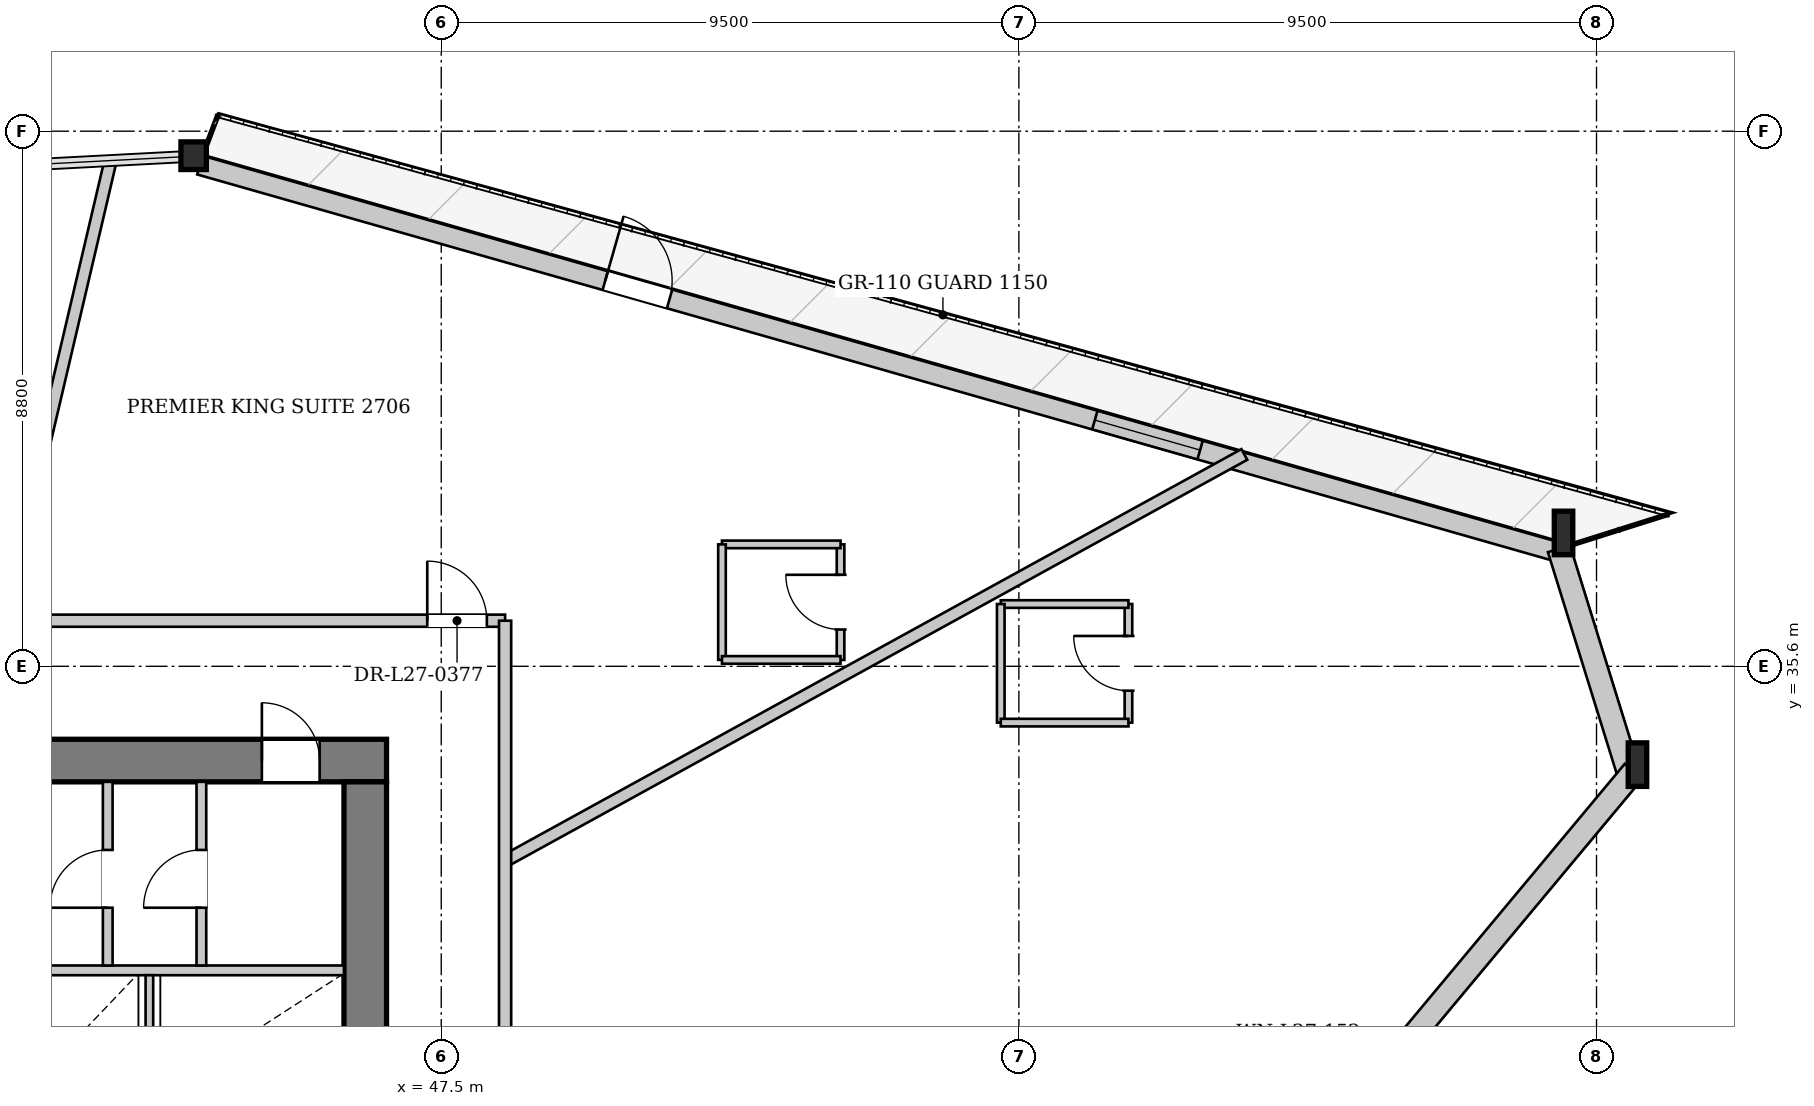
"""IFC4 building model, lengths in metres.
Left out: names, types, materials, properties, quantities, classifications, styles, units other than length and angle.
Written with IfcOpenShell. Run it as: python <this file> out.ifc"""

import sys

from ifc_helpers import new_model, si_unit, direction, frame, frame_2d, origin, origin_2d, place, context, subcontext, project, spatial, rectangle, i_section, extrude, source, transform, mapped, element, fill, save


model = new_model("IFC4")
c1 = context("Model", 3, precision=1e-05, world=origin(), true_north=direction((0.0, 1.0)))
c2 = subcontext(c1, "Body", "Model", "MODEL_VIEW")
j1 = project(units=[si_unit("LENGTHUNIT", "METRE"), si_unit("PLANEANGLEUNIT", "RADIAN")], contexts=[c1])
p1 = place(None, origin())
s1 = spatial("IfcSite", under=j1, at=p1, CompositionType="ELEMENT")
p2 = place(p1, origin())
s2 = spatial("IfcBuilding", under=s1, at=p2, CompositionType="ELEMENT")
p3 = place(p2, frame((0.0, 0.0, 105.7)))
s3 = spatial("IfcBuildingStorey", under=s2, at=p3, CompositionType="ELEMENT", Elevation=105.7)
m1 = source(origin(), c2, "Body", "SweptSolid", [
    extrude(i_section(OverallWidth=0.304, OverallDepth=0.716, WebThickness=0.021, FlangeThickness=0.04, at=origin_2d()), origin(), (0.0, 0.0, 1.0), 3.42),
])
p4 = place(p3, frame((67.255, 33.752, 0.0), z_axis=(-0.047894435472, 0.135260738032, 0.989651785123), x_axis=(-0.942650051896, -0.333782683284, 0.0)))
e1 = element("IfcColumn", 1, at=p4, inside=s3, PredefinedType="COLUMN", context=c2, shape_type="MappedRepresentation", body=[
    mapped(m1, transform((0.0, 0.0, 0.0), x_axis=(1.0, 0.0, 0.0), y_axis=(0.0, 1.0, 0.0), z_axis=(0.0, 0.0, 1.0), scale=1.0)),
])
m2 = source(origin(), c2, "Body", "SweptSolid", [
    extrude(i_section(OverallWidth=0.304, OverallDepth=0.716, WebThickness=0.021, FlangeThickness=0.04, at=origin_2d()), origin(), (0.0, 0.0, 1.0), 3.416),
])
p5 = place(p3, frame((66.063, 37.59, 0.0), z_axis=(-0.062036324357, 0.119141189749, 0.990937370052), x_axis=(-0.886964034529, -0.461838501483, 0.0)))
e2 = element("IfcColumn", 2, at=p5, inside=s3, PredefinedType="COLUMN", context=c2, shape_type="MappedRepresentation", body=[
    mapped(m2, transform((0.0, 0.0, 0.0), x_axis=(1.0, 0.0, 0.0), y_axis=(0.0, 1.0, 0.0), z_axis=(0.0, 0.0, 1.0), scale=1.0)),
])
m3 = source(origin(), c2, "Body", "SweptSolid", [
    extrude(i_section(OverallWidth=0.418, OverallDepth=0.455, WebThickness=0.038, FlangeThickness=0.059, at=origin_2d()), origin(), (0.0, 0.0, 1.0), 3.397),
])
p6 = place(p3, frame((43.573, 43.997, 0.0), z_axis=(-0.085727236226, 0.000143717077, 0.996318633929), x_axis=(-0.001676443579, -0.999998594767, 0.0)))
e3 = element("IfcColumn", 3, at=p6, inside=s3, PredefinedType="COLUMN", context=c2, shape_type="MappedRepresentation", body=[
    mapped(m3, transform((0.0, 0.0, 0.0), x_axis=(1.0, 0.0, 0.0), y_axis=(0.0, 1.0, 0.0), z_axis=(0.0, 0.0, 1.0), scale=1.0)),
])
p7 = place(p3, frame((43.53, 43.843, 0.0), z_axis=(0.0, 0.0, 1.0), x_axis=(0.961735223094, -0.273980584458, 0.0)))
e4 = element("IfcWall", 4, at=p7, inside=s3, PredefinedType="SOLIDWALL", context=c2, shape_type="SweptSolid", body=[
    extrude(rectangle(XDim=23.385, YDim=0.32, at=frame_2d((11.692, 0.0))), origin(), (0.0, 0.0, 1.0), 2.692),
])
p8 = place(p7, frame((6.933, 0.0, 0.0)))
e5 = element("IfcOpeningElement", 5, at=p8, cuts=e4, PredefinedType="OPENING", context=c2, shape_type="SweptSolid", body=[
    extrude(rectangle(XDim=1.1, YDim=2.3, at=frame_2d((0.55, 1.15))), frame((0.0, 0.17, 0.0), z_axis=(0.0, -1.0, 0.0), x_axis=(1.0, 0.0, 0.0)), (0.0, 0.0, 1.0), 0.34),
])
p9 = place(p7, frame((15.305, 0.0, 0.372)))
e6 = element("IfcOpeningElement", 6, at=p9, cuts=e4, PredefinedType="OPENING", context=c2, shape_type="SweptSolid", body=[
    extrude(rectangle(XDim=1.8, YDim=2.2, at=frame_2d((0.9, 1.1))), frame((0.0, 0.17, 0.0), z_axis=(0.0, -1.0, 0.0), x_axis=(1.0, 0.0, 0.0)), (0.0, 0.0, 1.0), 0.34),
])
p10 = place(p3, frame((65.882, 37.533, 0.0), z_axis=(0.0, 0.0, 1.0), x_axis=(0.296531061264, -0.955023208988, 0.0)))
e7 = element("IfcWall", 7, at=p10, inside=s3, PredefinedType="SOLIDWALL", context=c2, shape_type="SweptSolid", body=[
    extrude(rectangle(XDim=4.019, YDim=0.38, at=frame_2d((2.009, 0.0))), origin(), (0.0, 0.0, 1.0), 2.692),
])
p11 = place(p3, frame((67.109, 33.873, 0.0), z_axis=(0.0, 0.0, 1.0), x_axis=(-0.640571779822, -0.767898297234, 0.0)))
e8 = element("IfcWall", 8, at=p11, inside=s3, PredefinedType="SOLIDWALL", context=c2, shape_type="SweptSolid", body=[
    extrude(rectangle(XDim=23.985, YDim=0.38, at=frame_2d((11.993, 0.0))), origin(), (0.0, 0.0, 1.0), 2.692),
])
p12 = place(p11, frame((5.616, 0.0, 0.322)))
e9 = element("IfcOpeningElement", 9, at=p12, cuts=e8, PredefinedType="OPENING", context=c2, shape_type="SweptSolid", body=[
    extrude(rectangle(XDim=2.2, YDim=2.25, at=frame_2d((1.1, 1.125))), frame((0.0, 0.2, 0.0), z_axis=(0.0, -1.0, 0.0), x_axis=(1.0, 0.0, 0.0)), (0.0, 0.0, 1.0), 0.4),
])
p13 = place(p11, frame((16.169, 0.0, 0.322)))
e10 = element("IfcOpeningElement", 10, at=p13, cuts=e8, PredefinedType="OPENING", context=c2, shape_type="SweptSolid", body=[
    extrude(rectangle(XDim=2.2, YDim=2.25, at=frame_2d((1.1, 1.125))), frame((0.0, 0.2, 0.0), z_axis=(0.0, -1.0, 0.0), x_axis=(1.0, 0.0, 0.0)), (0.0, 0.0, 1.0), 0.4),
])
p14 = place(p3, frame((29.4, 34.05, 0.0), z_axis=(0.0, 0.0, 1.0), x_axis=(1.0, 0.0, 0.0)))
e11 = element("IfcWall", 11, at=p14, inside=s3, PredefinedType="SHEAR", context=c2, shape_type="SweptSolid", body=[
    extrude(rectangle(XDim=17.2, YDim=0.7, at=frame_2d((8.6, 0.0))), origin(), (0.0, 0.0, 1.0), 3.3),
])
p15 = place(p14, frame((1.7, 0.0, 0.0)))
e12 = element("IfcOpeningElement", 12, at=p15, cuts=e11, PredefinedType="OPENING", context=c2, shape_type="SweptSolid", body=[
    extrude(rectangle(XDim=0.95, YDim=2.1, at=frame_2d((0.475, 1.05))), frame((0.0, 0.36, 0.0), z_axis=(0.0, -1.0, 0.0), x_axis=(1.0, 0.0, 0.0)), (0.0, 0.0, 1.0), 0.72),
])
p16 = place(p14, frame((4.08, 0.0, 0.0)))
e13 = element("IfcOpeningElement", 13, at=p16, cuts=e11, PredefinedType="OPENING", context=c2, shape_type="SweptSolid", body=[
    extrude(rectangle(XDim=1.32, YDim=2.2, at=frame_2d((0.66, 1.1))), frame((0.0, 0.36, 0.0), z_axis=(0.0, -1.0, 0.0), x_axis=(1.0, 0.0, 0.0)), (0.0, 0.0, 1.0), 0.72),
])
p17 = place(p14, frame((15.15, 0.0, 0.0)))
e14 = element("IfcOpeningElement", 14, at=p17, cuts=e11, PredefinedType="OPENING", context=c2, shape_type="SweptSolid", body=[
    extrude(rectangle(XDim=0.95, YDim=2.1, at=frame_2d((0.475, 1.05))), frame((0.0, 0.36, 0.0), z_axis=(0.0, -1.0, 0.0), x_axis=(1.0, 0.0, 0.0)), (0.0, 0.0, 1.0), 0.72),
])
p18 = place(p3, frame((46.25, 33.7, 0.0), z_axis=(0.0, 0.0, 1.0), x_axis=(0.0, -1.0, 0.0)))
e15 = element("IfcWall", 15, at=p18, inside=s3, PredefinedType="SHEAR", context=c2, shape_type="SweptSolid", body=[
    extrude(rectangle(XDim=14.2, YDim=0.7, at=frame_2d((7.1, 0.0))), origin(), (0.0, 0.0, 1.0), 3.3),
])
p19 = place(p18, frame((5.18, 0.0, 0.0)))
e16 = element("IfcOpeningElement", 16, at=p19, cuts=e15, PredefinedType="OPENING", context=c2, shape_type="SweptSolid", body=[
    extrude(rectangle(XDim=1.6, YDim=2.2, at=frame_2d((0.8, 1.1))), frame((0.0, 0.36, 0.0), z_axis=(0.0, -1.0, 0.0), x_axis=(1.0, 0.0, 0.0)), (0.0, 0.0, 1.0), 0.72),
])
p20 = place(p3, frame((40.72, 30.6, 0.0), z_axis=(0.0, 0.0, 1.0), x_axis=(1.0, 0.0, 0.0)))
e17 = element("IfcWall", 17, at=p20, inside=s3, PredefinedType="PARTITIONING", context=c2, shape_type="SweptSolid", body=[
    extrude(rectangle(XDim=5.18, YDim=0.16, at=frame_2d((2.59, 0.0))), origin(), (0.0, 0.0, 1.0), 3.3),
])
p21 = place(p3, frame((42.7, 28.6, 0.0), z_axis=(0.0, 0.0, 1.0), x_axis=(0.0, 1.0, 0.0)))
e18 = element("IfcWall", 18, at=p21, inside=s3, PredefinedType="PARTITIONING", context=c2, shape_type="SweptSolid", body=[
    extrude(rectangle(XDim=1.92, YDim=0.125, at=frame_2d((0.96, 0.0))), origin(), (0.0, 0.0, 1.0), 3.3),
])
p22 = place(p3, frame((42.015, 30.68, 0.0), z_axis=(0.0, 0.0, 1.0), x_axis=(0.0, 1.0, 0.0)))
e19 = element("IfcWall", 19, at=p22, inside=s3, PredefinedType="PARTITIONING", context=c2, shape_type="SweptSolid", body=[
    extrude(rectangle(XDim=3.02, YDim=0.16, at=frame_2d((1.51, 0.0))), origin(), (0.0, 0.0, 1.0), 3.3),
])
p23 = place(p22, frame((0.95, 0.0, 0.0)))
e20 = element("IfcOpeningElement", 20, at=p23, cuts=e19, PredefinedType="OPENING", context=c2, shape_type="SweptSolid", body=[
    extrude(rectangle(XDim=0.95, YDim=2.1, at=frame_2d((0.475, 1.05))), frame((0.0, 0.09, 0.0), z_axis=(0.0, -1.0, 0.0), x_axis=(1.0, 0.0, 0.0)), (0.0, 0.0, 1.0), 0.18),
])
p24 = place(p3, frame((43.555, 30.68, 0.0), z_axis=(0.0, 0.0, 1.0), x_axis=(0.0, 1.0, 0.0)))
e21 = element("IfcWall", 21, at=p24, inside=s3, PredefinedType="PARTITIONING", context=c2, shape_type="SweptSolid", body=[
    extrude(rectangle(XDim=3.02, YDim=0.16, at=frame_2d((1.51, 0.0))), origin(), (0.0, 0.0, 1.0), 3.3),
])
p25 = place(p24, frame((0.95, 0.0, 0.0)))
e22 = element("IfcOpeningElement", 22, at=p25, cuts=e21, PredefinedType="OPENING", context=c2, shape_type="SweptSolid", body=[
    extrude(rectangle(XDim=0.95, YDim=2.1, at=frame_2d((0.475, 1.05))), frame((0.0, 0.09, 0.0), z_axis=(0.0, -1.0, 0.0), x_axis=(1.0, 0.0, 0.0)), (0.0, 0.0, 1.0), 0.18),
])
p26 = place(p3, frame((48.55, 32.4, 0.0), z_axis=(0.0, 0.0, 1.0), x_axis=(0.87630505822, 0.481756624176, 0.0)))
e23 = element("IfcWall", 23, at=p26, inside=s3, PredefinedType="PARTITIONING", context=c2, shape_type="SweptSolid", body=[
    extrude(rectangle(XDim=13.875, YDim=0.2, at=frame_2d((6.937, 0.0))), origin(), (0.0, 0.0, 1.0), 3.3),
])
p27 = place(p3, frame((40.287, 36.35, 0.0), z_axis=(0.0, 0.0, 1.0), x_axis=(0.22833612857, 0.973582360353, 0.0)))
e24 = element("IfcWall", 24, at=p27, inside=s3, PredefinedType="PARTITIONING", context=c2, shape_type="SweptSolid", body=[
    extrude(rectangle(XDim=7.741, YDim=0.2, at=frame_2d((3.871, 0.0))), origin(), (0.0, 0.0, 1.0), 3.3),
])
p28 = place(p3, frame((58.802, 34.674, 0.0), z_axis=(0.0, 0.0, 1.0), x_axis=(0.0, 1.0, 0.0)))
e25 = element("IfcWall", 25, at=p28, inside=s3, PredefinedType="PARTITIONING", context=c2, shape_type="SweptSolid", body=[
    extrude(rectangle(XDim=1.95, YDim=0.125, at=frame_2d((0.975, 0.0))), origin(), (0.0, 0.0, 1.0), 3.3),
])
p29 = place(p28, frame((0.525, 0.0, 0.0)))
e26 = element("IfcOpeningElement", 26, at=p29, cuts=e25, PredefinedType="OPENING", context=c2, shape_type="SweptSolid", body=[
    extrude(rectangle(XDim=0.9, YDim=2.1, at=frame_2d((0.45, 1.05))), frame((0.0, 0.073, 0.0), z_axis=(0.0, -1.0, 0.0), x_axis=(1.0, 0.0, 0.0)), (0.0, 0.0, 1.0), 0.145),
])
p30 = place(p3, frame((58.802, 36.624, 0.0), z_axis=(0.0, 0.0, 1.0), x_axis=(-1.0, 0.0, 0.0)))
e27 = element("IfcWall", 27, at=p30, inside=s3, PredefinedType="PARTITIONING", context=c2, shape_type="SweptSolid", body=[
    extrude(rectangle(XDim=2.1, YDim=0.125, at=frame_2d((1.05, 0.0))), origin(), (0.0, 0.0, 1.0), 3.3),
])
p31 = place(p3, frame((56.702, 36.624, 0.0), z_axis=(0.0, 0.0, 1.0), x_axis=(0.0, -1.0, 0.0)))
e28 = element("IfcWall", 28, at=p31, inside=s3, PredefinedType="PARTITIONING", context=c2, shape_type="SweptSolid", body=[
    extrude(rectangle(XDim=1.95, YDim=0.125, at=frame_2d((0.975, 0.0))), origin(), (0.0, 0.0, 1.0), 3.3),
])
p32 = place(p3, frame((56.702, 34.674, 0.0), z_axis=(0.0, 0.0, 1.0), x_axis=(1.0, 0.0, 0.0)))
e29 = element("IfcWall", 29, at=p32, inside=s3, PredefinedType="PARTITIONING", context=c2, shape_type="SweptSolid", body=[
    extrude(rectangle(XDim=2.1, YDim=0.125, at=frame_2d((1.05, 0.0))), origin(), (0.0, 0.0, 1.0), 2.795),
])
p33 = place(p3, frame((54.067, 35.705, 0.0), z_axis=(0.0, 0.0, 1.0), x_axis=(0.0, 1.0, 0.0)))
e30 = element("IfcWall", 30, at=p33, inside=s3, PredefinedType="PARTITIONING", context=c2, shape_type="SweptSolid", body=[
    extrude(rectangle(XDim=1.9, YDim=0.125, at=frame_2d((0.95, 0.0))), origin(), (0.0, 0.0, 1.0), 3.3),
])
p34 = place(p33, frame((0.5, 0.0, 0.0)))
e31 = element("IfcOpeningElement", 31, at=p34, cuts=e30, PredefinedType="OPENING", context=c2, shape_type="SweptSolid", body=[
    extrude(rectangle(XDim=0.9, YDim=2.1, at=frame_2d((0.45, 1.05))), frame((0.0, 0.073, 0.0), z_axis=(0.0, -1.0, 0.0), x_axis=(1.0, 0.0, 0.0)), (0.0, 0.0, 1.0), 0.145),
])
p35 = place(p3, frame((54.067, 37.605, 0.0), z_axis=(0.0, 0.0, 1.0), x_axis=(-1.0, 0.0, 0.0)))
e32 = element("IfcWall", 32, at=p35, inside=s3, PredefinedType="PARTITIONING", context=c2, shape_type="SweptSolid", body=[
    extrude(rectangle(XDim=1.95, YDim=0.125, at=frame_2d((0.975, 0.0))), origin(), (0.0, 0.0, 1.0), 3.3),
])
p36 = place(p3, frame((52.117, 37.605, 0.0), z_axis=(0.0, 0.0, 1.0), x_axis=(0.0, -1.0, 0.0)))
e33 = element("IfcWall", 33, at=p36, inside=s3, PredefinedType="PARTITIONING", context=c2, shape_type="SweptSolid", body=[
    extrude(rectangle(XDim=1.9, YDim=0.125, at=frame_2d((0.95, 0.0))), origin(), (0.0, 0.0, 1.0), 3.3),
])
p37 = place(p3, frame((52.117, 35.705, 0.0), z_axis=(0.0, 0.0, 1.0), x_axis=(1.0, 0.0, 0.0)))
e34 = element("IfcWall", 34, at=p37, inside=s3, PredefinedType="PARTITIONING", context=c2, shape_type="SweptSolid", body=[
    extrude(rectangle(XDim=1.95, YDim=0.125, at=frame_2d((0.975, 0.0))), origin(), (0.0, 0.0, 1.0), 3.3),
])
p38 = place(p3, frame((27.45, 36.35, 0.0), z_axis=(0.0, 0.0, 1.0), x_axis=(1.0, 0.0, 0.0)))
e35 = element("IfcWall", 35, at=p38, inside=s3, PredefinedType="PARTITIONING", context=c2, shape_type="SweptSolid", body=[
    extrude(rectangle(XDim=21.1, YDim=0.2, at=frame_2d((10.55, 0.0))), origin(), (0.0, 0.0, 1.0), 3.3),
])
p39 = place(p38, frame((19.82, 0.0, 0.0)))
e36 = element("IfcOpeningElement", 36, at=p39, cuts=e35, PredefinedType="OPENING", context=c2, shape_type="SweptSolid", body=[
    extrude(rectangle(XDim=0.98, YDim=2.15, at=frame_2d((0.49, 1.075))), frame((0.0, 0.11, 0.0), z_axis=(0.0, -1.0, 0.0), x_axis=(1.0, 0.0, 0.0)), (0.0, 0.0, 1.0), 0.22),
])
p40 = place(p38, frame((5.605, 0.0, 0.0)))
e37 = element("IfcOpeningElement", 37, at=p40, cuts=e35, PredefinedType="OPENING", context=c2, shape_type="SweptSolid", body=[
    extrude(rectangle(XDim=0.98, YDim=2.15, at=frame_2d((0.49, 1.075))), frame((0.0, 0.11, 0.0), z_axis=(0.0, -1.0, 0.0), x_axis=(1.0, 0.0, 0.0)), (0.0, 0.0, 1.0), 0.22),
])
p41 = place(p3, frame((48.55, 16.85, 0.0), z_axis=(0.0, 0.0, 1.0), x_axis=(0.0, 1.0, 0.0)))
e38 = element("IfcWall", 38, at=p41, inside=s3, PredefinedType="PARTITIONING", context=c2, shape_type="SweptSolid", body=[
    extrude(rectangle(XDim=19.5, YDim=0.2, at=frame_2d((9.75, 0.0))), origin(), (0.0, 0.0, 1.0), 3.3),
])
p42 = place(p41, frame((1.869, 0.0, 0.0)))
e39 = element("IfcOpeningElement", 39, at=p42, cuts=e38, PredefinedType="OPENING", context=c2, shape_type="SweptSolid", body=[
    extrude(rectangle(XDim=0.98, YDim=2.15, at=frame_2d((0.49, 1.075))), frame((0.0, 0.11, 0.0), z_axis=(0.0, -1.0, 0.0), x_axis=(1.0, 0.0, 0.0)), (0.0, 0.0, 1.0), 0.22),
])
p43 = place(p41, frame((11.325, 0.0, 0.0)))
e40 = element("IfcOpeningElement", 40, at=p43, cuts=e38, PredefinedType="OPENING", context=c2, shape_type="SweptSolid", body=[
    extrude(rectangle(XDim=0.98, YDim=2.15, at=frame_2d((0.49, 1.075))), frame((0.0, 0.11, 0.0), z_axis=(0.0, -1.0, 0.0), x_axis=(1.0, 0.0, 0.0)), (0.0, 0.0, 1.0), 0.22),
])
m4 = source(origin(), c2, "Body", "SweptSolid", [
    extrude(rectangle(XDim=1.1, YDim=2.3, at=frame_2d((0.55, 1.15))), frame((0.0, 0.025, 0.0), z_axis=(0.0, -1.0, 0.0), x_axis=(1.0, 0.0, 0.0)), (0.0, 0.0, 1.0), 0.05),
])
p44 = place(p8, origin())
e41 = element("IfcDoor", 41, at=p44, inside=s3, OperationType="SINGLE_SWING_LEFT", PredefinedType="DOOR", context=c2, shape_type="MappedRepresentation", body=[
    mapped(m4, transform((0.0, 0.0, 0.0), x_axis=(1.0, 0.0, 0.0), y_axis=(0.0, 1.0, 0.0), z_axis=(0.0, 0.0, 1.0), scale=1.0)),
])
fill(e5, e41)
m5 = source(origin(), c2, "Body", "SweptSolid", [
    extrude(rectangle(XDim=1.8, YDim=2.2, at=frame_2d((0.9, 1.1))), frame((0.0, 0.03, 0.0), z_axis=(0.0, -1.0, 0.0), x_axis=(1.0, 0.0, 0.0)), (0.0, 0.0, 1.0), 0.06),
])
p45 = place(p9, origin())
e42 = element("IfcWindow", 42, at=p45, inside=s3, PartitioningType="SINGLE_PANEL", PredefinedType="WINDOW", context=c2, shape_type="MappedRepresentation", body=[
    mapped(m5, transform((0.0, 0.0, 0.0), x_axis=(1.0, 0.0, 0.0), y_axis=(0.0, 1.0, 0.0), z_axis=(0.0, 0.0, 1.0), scale=1.0)),
])
fill(e6, e42)
m6 = source(origin(), c2, "Body", "SweptSolid", [
    extrude(rectangle(XDim=0.95, YDim=2.1, at=frame_2d((0.475, 1.05))), frame((0.0, 0.025, 0.0), z_axis=(0.0, -1.0, 0.0), x_axis=(1.0, 0.0, 0.0)), (0.0, 0.0, 1.0), 0.05),
])
p46 = place(p23, origin())
e43 = element("IfcDoor", 43, at=p46, inside=s3, OperationType="SINGLE_SWING_LEFT", PredefinedType="DOOR", context=c2, shape_type="MappedRepresentation", body=[
    mapped(m6, transform((0.0, 0.0, 0.0), x_axis=(1.0, 0.0, 0.0), y_axis=(0.0, 1.0, 0.0), z_axis=(0.0, 0.0, 1.0), scale=1.0)),
])
fill(e20, e43)
p47 = place(p25, origin())
e44 = element("IfcDoor", 44, at=p47, inside=s3, OperationType="SINGLE_SWING_LEFT", PredefinedType="DOOR", context=c2, shape_type="MappedRepresentation", body=[
    mapped(m6, transform((0.0, 0.0, 0.0), x_axis=(1.0, 0.0, 0.0), y_axis=(0.0, 1.0, 0.0), z_axis=(0.0, 0.0, 1.0), scale=1.0)),
])
fill(e22, e44)
p48 = place(p17, origin())
e45 = element("IfcDoor", 45, at=p48, inside=s3, OperationType="SINGLE_SWING_LEFT", PredefinedType="DOOR", context=c2, shape_type="MappedRepresentation", body=[
    mapped(m6, transform((0.0, 0.0, 0.0), x_axis=(1.0, 0.0, 0.0), y_axis=(0.0, 1.0, 0.0), z_axis=(0.0, 0.0, 1.0), scale=1.0)),
])
fill(e14, e45)
m7 = source(origin(), c2, "Body", "SweptSolid", [
    extrude(rectangle(XDim=0.9, YDim=2.1, at=frame_2d((0.45, 1.05))), frame((0.0, 0.025, 0.0), z_axis=(0.0, -1.0, 0.0), x_axis=(1.0, 0.0, 0.0)), (0.0, 0.0, 1.0), 0.05),
])
p49 = place(p29, origin())
e46 = element("IfcDoor", 46, at=p49, inside=s3, OperationType="SINGLE_SWING_RIGHT", PredefinedType="DOOR", context=c2, shape_type="MappedRepresentation", body=[
    mapped(m7, transform((0.0, 0.0, 0.0), x_axis=(1.0, 0.0, 0.0), y_axis=(0.0, 1.0, 0.0), z_axis=(0.0, 0.0, 1.0), scale=1.0)),
])
fill(e26, e46)
p50 = place(p34, origin())
e47 = element("IfcDoor", 47, at=p50, inside=s3, OperationType="SINGLE_SWING_RIGHT", PredefinedType="DOOR", context=c2, shape_type="MappedRepresentation", body=[
    mapped(m7, transform((0.0, 0.0, 0.0), x_axis=(1.0, 0.0, 0.0), y_axis=(0.0, 1.0, 0.0), z_axis=(0.0, 0.0, 1.0), scale=1.0)),
])
fill(e31, e47)
m8 = source(origin(), c2, "Body", "SweptSolid", [
    extrude(rectangle(XDim=0.98, YDim=2.15, at=frame_2d((0.49, 1.075))), frame((0.0, 0.025, 0.0), z_axis=(0.0, -1.0, 0.0), x_axis=(1.0, 0.0, 0.0)), (0.0, 0.0, 1.0), 0.05),
])
p51 = place(p39, origin())
e48 = element("IfcDoor", 48, at=p51, inside=s3, OperationType="SINGLE_SWING_LEFT", PredefinedType="DOOR", context=c2, shape_type="MappedRepresentation", body=[
    mapped(m8, transform((0.0, 0.0, 0.0), x_axis=(1.0, 0.0, 0.0), y_axis=(0.0, 1.0, 0.0), z_axis=(0.0, 0.0, 1.0), scale=1.0)),
])
fill(e36, e48)
save(model, sys.argv[1])
